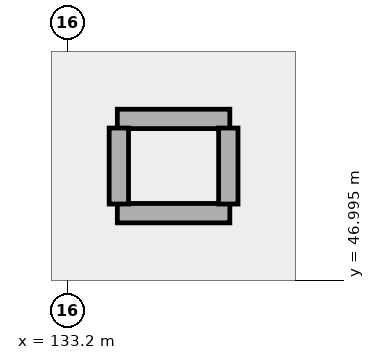
"""IFC4 building model, lengths in metres.
Left out: names, types, materials, properties, quantities, classifications, styles, units other than length and angle.
Written with IfcOpenShell. Run it as: python <this file> out.ifc"""

import sys

from ifc_helpers import new_model, si_unit, direction, frame, frame_2d, origin, place, context, subcontext, project, spatial, rectangle, extrude, element, save


model = new_model("IFC4")
c1 = context("Model", 3, precision=1e-05, world=origin(), true_north=direction((0.0, 1.0)))
c2 = subcontext(c1, "Body", "Model", "MODEL_VIEW")
j1 = project(units=[si_unit("LENGTHUNIT", "METRE"), si_unit("PLANEANGLEUNIT", "RADIAN")], contexts=[c1])
p1 = place(None, origin())
s1 = spatial("IfcSite", under=j1, at=p1, CompositionType="ELEMENT")
p2 = place(p1, origin())
s2 = spatial("IfcBuilding", under=s1, at=p2, CompositionType="ELEMENT")
p3 = place(p2, frame((0.0, 0.0, 20.7)))
s3 = spatial("IfcBuildingStorey", under=s2, at=p3, CompositionType="ELEMENT", Elevation=20.7)
for number, where, z_axis, x_axis in (
    (1, (133.86, 49.12, 0.0), (0.0, 0.0, 1.0), (1.0, 0.0, 0.0)),
    (2, (133.86, 47.88, 0.0), (0.0, 0.0, 1.0), (1.0, 0.0, 0.0)),
):
    element("IfcWall", number, at=place(p3, frame(where, z_axis=z_axis, x_axis=x_axis)), inside=s3, PredefinedType="PARTITIONING", context=c2, shape_type="SweptSolid", body=[
        extrude(rectangle(XDim=1.48, YDim=0.255, at=frame_2d((0.74, 0.0))), origin(), (0.0, 0.0, 1.0), 4.98),
    ])
for number, where, z_axis, x_axis in (
    (3, (133.88, 48.0, 0.0), (0.0, 0.0, 1.0), (0.0, 1.0, 0.0)),
    (4, (135.32, 48.0, 0.0), (0.0, 0.0, 1.0), (0.0, 1.0, 0.0)),
):
    element("IfcWall", number, at=place(p3, frame(where, z_axis=z_axis, x_axis=x_axis)), inside=s3, PredefinedType="PARTITIONING", context=c2, shape_type="SweptSolid", body=[
        extrude(rectangle(XDim=1.0, YDim=0.255, at=frame_2d((0.5, 0.0))), origin(), (0.0, 0.0, 1.0), 4.98),
    ])
save(model, sys.argv[1])
